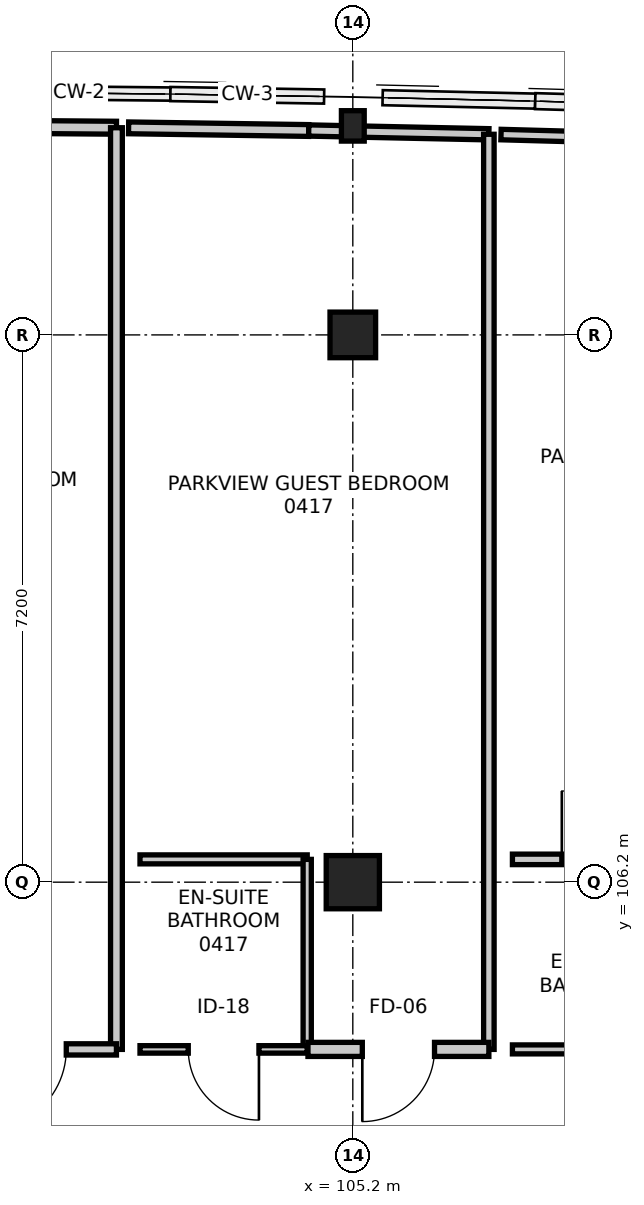
"""IFC4 building model, lengths in metres.
Left out: names, types, materials, properties, quantities, classifications, styles, units other than length and angle.
Written with IfcOpenShell. Run it as: python <this file> out.ifc"""

import sys

from ifc_helpers import new_model, si_unit, direction, frame, frame_2d, origin, origin_2d, place, context, subcontext, project, spatial, rectangle, i_section, extrude, element, fill, save


model = new_model("IFC4")
c1 = context("Model", 3, precision=1e-05, world=origin(), true_north=direction((0.0, 1.0)))
c2 = subcontext(c1, "Body", "Model", "MODEL_VIEW")
j1 = project(units=[si_unit("LENGTHUNIT", "METRE"), si_unit("PLANEANGLEUNIT", "RADIAN")], contexts=[c1])
p1 = place(None, origin())
s1 = spatial("IfcSite", under=j1, at=p1, CompositionType="ELEMENT")
p2 = place(p1, origin())
s2 = spatial("IfcBuilding", under=s1, at=p2, CompositionType="ELEMENT")
p3 = place(p2, frame((0.0, 0.0, 19.2)))
s3 = spatial("IfcBuildingStorey", under=s2, at=p3, CompositionType="ELEMENT", Elevation=19.2)
p4 = place(p3, frame((105.2, 106.2, 0.0), z_axis=(0.0, 0.0, 1.0), x_axis=(1.0, 0.0, 0.0)))
e1 = element("IfcColumn", 1, at=p4, inside=s3, PredefinedType="COLUMN", context=c2, shape_type="SweptSolid", body=[
    extrude(rectangle(XDim=0.7, YDim=0.7, at=origin_2d()), origin(), (0.0, 0.0, 1.0), 3.6),
])
p5 = place(p3, frame((105.2, 113.4, 0.0), z_axis=(0.0, 0.0, 1.0), x_axis=(1.0, 0.0, 0.0)))
e2 = element("IfcColumn", 2, at=p5, inside=s3, PredefinedType="COLUMN", context=c2, shape_type="SweptSolid", body=[
    extrude(rectangle(XDim=0.6, YDim=0.6, at=origin_2d()), origin(), (0.0, 0.0, 1.0), 3.6),
])
p6 = place(p3, frame((105.2, 116.15, 0.0), z_axis=(0.0, 0.0, 1.0), x_axis=(1.0, 0.0, 0.0)))
e3 = element("IfcColumn", 3, at=p6, inside=s3, PredefinedType="COLUMN", context=c2, shape_type="SweptSolid", body=[
    extrude(i_section(OverallWidth=0.3, OverallDepth=0.4, WebThickness=0.013, FlangeThickness=0.024, FilletRadius=0.027, at=origin_2d()), origin(), (0.0, 0.0, 1.0), 3.6),
])
p7 = place(p3, frame((99.72, 116.144, 0.0), z_axis=(0.0, 0.0, 1.0), x_axis=(0.999969357959, -0.007828355089, 0.0)))
e4 = element("IfcWall", 4, at=p7, inside=s3, PredefinedType="PARTITIONING", context=c2, shape_type="SweptSolid", body=[
    extrude(rectangle(XDim=2.37, YDim=0.17, at=frame_2d((1.185, 0.0))), origin(), (0.0, 0.0, 1.0), 2.926),
])
p8 = place(p3, frame((102.09, 116.126, 0.0), z_axis=(0.0, 0.0, 1.0), x_axis=(0.0, -1.0, 0.0)))
e5 = element("IfcWall", 5, at=p8, inside=s3, PredefinedType="PARTITIONING", context=c2, shape_type="SweptSolid", body=[
    extrude(rectangle(XDim=12.126, YDim=0.155, at=frame_2d((6.063, 0.0))), origin(), (0.0, 0.0, 1.0), 2.735),
])
p9 = place(p3, frame((102.09, 104.0, 0.0), z_axis=(0.0, 0.0, 1.0), x_axis=(-1.0, 0.0, 0.0)))
e6 = element("IfcWall", 6, at=p9, inside=s3, PredefinedType="PARTITIONING", context=c2, shape_type="SweptSolid", body=[
    extrude(rectangle(XDim=2.38, YDim=0.148, at=frame_2d((1.19, 0.0))), origin(), (0.0, 0.0, 1.0), 3.35),
])
p10 = place(p9, frame((0.66, 0.0, 0.0)))
e7 = element("IfcOpeningElement", 7, at=p10, cuts=e6, PredefinedType="OPENING", context=c2, shape_type="SweptSolid", body=[
    extrude(rectangle(XDim=1.06, YDim=2.2, at=frame_2d((0.53, 1.1))), frame((0.0, 0.084, 0.0), z_axis=(0.0, -1.0, 0.0), x_axis=(1.0, 0.0, 0.0)), (0.0, 0.0, 1.0), 0.168),
])
p11 = place(p3, frame((102.4, 106.5, 0.0), z_axis=(0.0, 0.0, 1.0), x_axis=(1.0, 0.0, 0.0)))
e8 = element("IfcWall", 8, at=p11, inside=s3, PredefinedType="PARTITIONING", context=c2, shape_type="SweptSolid", body=[
    extrude(rectangle(XDim=2.2, YDim=0.118, at=frame_2d((1.1, 0.0))), origin(), (0.0, 0.0, 1.0), 3.35),
])
p12 = place(p3, frame((104.6, 106.5, 0.0), z_axis=(0.0, 0.0, 1.0), x_axis=(0.0, -1.0, 0.0)))
e9 = element("IfcWall", 9, at=p12, inside=s3, PredefinedType="PARTITIONING", context=c2, shape_type="SweptSolid", body=[
    extrude(rectangle(XDim=2.5, YDim=0.108, at=frame_2d((1.25, 0.0))), origin(), (0.0, 0.0, 1.0), 2.735),
])
p13 = place(p3, frame((104.6, 104.0, 0.0), z_axis=(0.0, 0.0, 1.0), x_axis=(-1.0, 0.0, 0.0)))
e10 = element("IfcWall", 10, at=p13, inside=s3, PredefinedType="PARTITIONING", context=c2, shape_type="SweptSolid", body=[
    extrude(rectangle(XDim=2.2, YDim=0.098, at=frame_2d((1.1, 0.0))), origin(), (0.0, 0.0, 1.0), 3.35),
])
p14 = place(p13, frame((0.635, 0.0, 0.0)))
e11 = element("IfcOpeningElement", 11, at=p14, cuts=e10, PredefinedType="OPENING", context=c2, shape_type="SweptSolid", body=[
    extrude(rectangle(XDim=0.93, YDim=2.13, at=frame_2d((0.465, 1.065))), frame((0.0, 0.059, 0.0), z_axis=(0.0, -1.0, 0.0), x_axis=(1.0, 0.0, 0.0)), (0.0, 0.0, 1.0), 0.118),
])
p15 = place(p3, frame((102.25, 116.124, 0.0), z_axis=(0.0, 0.0, 1.0), x_axis=(0.999891529441, -0.014728521705, 0.0)))
e12 = element("IfcWall", 12, at=p15, inside=s3, PredefinedType="PARTITIONING", context=c2, shape_type="SweptSolid", body=[
    extrude(rectangle(XDim=2.37, YDim=0.155, at=frame_2d((1.185, 0.0))), origin(), (0.0, 0.0, 1.0), 2.926),
])
p16 = place(p3, frame((104.62, 116.089, 0.0), z_axis=(0.0, 0.0, 1.0), x_axis=(0.999781400282, -0.020908171861, 0.0)))
e13 = element("IfcWall", 13, at=p16, inside=s3, PredefinedType="PARTITIONING", context=c2, shape_type="SweptSolid", body=[
    extrude(rectangle(XDim=2.37, YDim=0.148, at=frame_2d((1.185, 0.0))), origin(), (0.0, 0.0, 1.0), 2.926),
])
p17 = place(p3, frame((106.99, 116.04, 0.0), z_axis=(0.0, 0.0, 1.0), x_axis=(0.0, -1.0, 0.0)))
e14 = element("IfcWall", 14, at=p17, inside=s3, PredefinedType="PARTITIONING", context=c2, shape_type="SweptSolid", body=[
    extrude(rectangle(XDim=12.04, YDim=0.138, at=frame_2d((6.02, 0.0))), origin(), (0.0, 0.0, 1.0), 2.735),
])
p18 = place(p3, frame((106.99, 104.0, 0.0), z_axis=(0.0, 0.0, 1.0), x_axis=(-1.0, 0.0, 0.0)))
e15 = element("IfcWall", 15, at=p18, inside=s3, PredefinedType="PARTITIONING", context=c2, shape_type="SweptSolid", body=[
    extrude(rectangle(XDim=2.38, YDim=0.185, at=frame_2d((1.19, 0.0))), origin(), (0.0, 0.0, 1.0), 2.685),
])
p19 = place(p18, frame((0.715, 0.0, 0.0)))
e16 = element("IfcOpeningElement", 16, at=p19, cuts=e15, PredefinedType="OPENING", context=c2, shape_type="SweptSolid", body=[
    extrude(rectangle(XDim=0.95, YDim=2.1, at=frame_2d((0.475, 1.05))), frame((0.0, 0.103, 0.0), z_axis=(0.0, -1.0, 0.0), x_axis=(1.0, 0.0, 0.0)), (0.0, 0.0, 1.0), 0.205),
])
p20 = place(p3, frame((107.3, 106.5, 0.0), z_axis=(0.0, 0.0, 1.0), x_axis=(1.0, 0.0, 0.0)))
e17 = element("IfcWall", 17, at=p20, inside=s3, PredefinedType="PARTITIONING", context=c2, shape_type="SweptSolid", body=[
    extrude(rectangle(XDim=2.2, YDim=0.138, at=frame_2d((1.1, 0.0))), origin(), (0.0, 0.0, 1.0), 3.35),
])
p21 = place(p20, frame((0.65, 0.0, 0.0)))
e18 = element("IfcOpeningElement", 18, at=p21, cuts=e17, PredefinedType="OPENING", context=c2, shape_type="SweptSolid", body=[
    extrude(rectangle(XDim=0.9, YDim=2.08, at=frame_2d((0.45, 1.04))), frame((0.0, 0.079, 0.0), z_axis=(0.0, -1.0, 0.0), x_axis=(1.0, 0.0, 0.0)), (0.0, 0.0, 1.0), 0.158),
])
p22 = place(p3, frame((109.5, 104.0, 0.0), z_axis=(0.0, 0.0, 1.0), x_axis=(-1.0, 0.0, 0.0)))
e19 = element("IfcWall", 19, at=p22, inside=s3, PredefinedType="PARTITIONING", context=c2, shape_type="SweptSolid", body=[
    extrude(rectangle(XDim=2.2, YDim=0.118, at=frame_2d((1.1, 0.0))), origin(), (0.0, 0.0, 1.0), 3.35),
])
p23 = place(p3, frame((107.15, 116.036, 0.0), z_axis=(0.0, 0.0, 1.0), x_axis=(0.999622004443, -0.027492694189, 0.0)))
e20 = element("IfcWall", 20, at=p23, inside=s3, PredefinedType="PARTITIONING", context=c2, shape_type="SweptSolid", body=[
    extrude(rectangle(XDim=2.371, YDim=0.138, at=frame_2d((1.186, 0.0))), origin(), (0.0, 0.0, 1.0), 2.926),
])
p24 = place(p10, origin())
e21 = element("IfcDoor", 21, at=p24, inside=s3, OperationType="SINGLE_SWING_RIGHT", PredefinedType="DOOR", context=c2, shape_type="SweptSolid", body=[
    extrude(rectangle(XDim=1.06, YDim=2.2, at=frame_2d((0.53, 1.1))), frame((0.0, 0.025, 0.0), z_axis=(0.0, -1.0, 0.0), x_axis=(1.0, 0.0, 0.0)), (0.0, 0.0, 1.0), 0.05),
])
fill(e7, e21)
p25 = place(p14, origin())
e22 = element("IfcDoor", 22, at=p25, inside=s3, OperationType="SINGLE_SWING_LEFT", PredefinedType="DOOR", context=c2, shape_type="SweptSolid", body=[
    extrude(rectangle(XDim=0.93, YDim=2.13, at=frame_2d((0.465, 1.065))), frame((0.0, 0.025, 0.0), z_axis=(0.0, -1.0, 0.0), x_axis=(1.0, 0.0, 0.0)), (0.0, 0.0, 1.0), 0.05),
])
fill(e11, e22)
p26 = place(p19, origin())
e23 = element("IfcDoor", 23, at=p26, inside=s3, OperationType="SINGLE_SWING_RIGHT", PredefinedType="DOOR", context=c2, shape_type="SweptSolid", body=[
    extrude(rectangle(XDim=0.95, YDim=2.1, at=frame_2d((0.475, 1.05))), frame((0.0, 0.025, 0.0), z_axis=(0.0, -1.0, 0.0), x_axis=(1.0, 0.0, 0.0)), (0.0, 0.0, 1.0), 0.05),
])
fill(e16, e23)
p27 = place(p21, origin())
e24 = element("IfcDoor", 24, at=p27, inside=s3, OperationType="SINGLE_SWING_LEFT", PredefinedType="DOOR", context=c2, shape_type="SweptSolid", body=[
    extrude(rectangle(XDim=0.9, YDim=2.08, at=frame_2d((0.45, 1.04))), frame((0.0, 0.025, 0.0), z_axis=(0.0, -1.0, 0.0), x_axis=(1.0, 0.0, 0.0)), (0.0, 0.0, 1.0), 0.05),
])
fill(e18, e24)
save(model, sys.argv[1])
